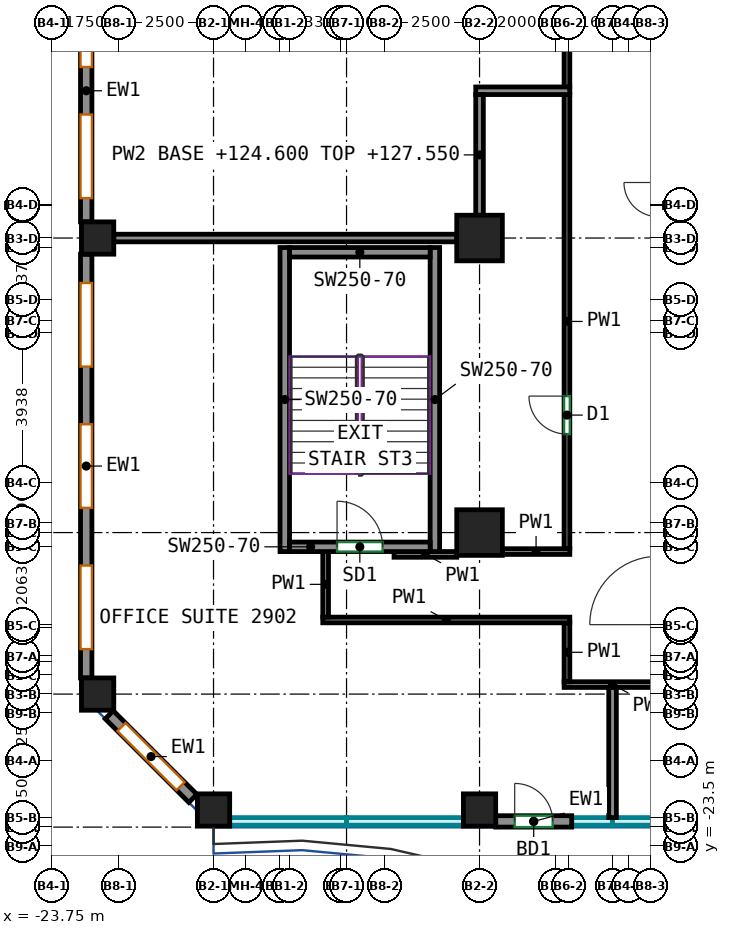
"""IFC4 building model, lengths in metres.
Left out: names, types, materials, properties, quantities, classifications, styles, units other than length and angle.
Written with IfcOpenShell. Run it as: python <this file> out.ifc"""

import sys

from ifc_helpers import new_model, si_unit, direction, frame, frame_2d, origin, origin_2d, place, context, subcontext, project, spatial, rectangle, extrude, source, transform, mapped, element, fill, save


model = new_model("IFC4")
c1 = context("Model", 3, precision=1e-05, world=origin(), true_north=direction((0.0, 1.0)))
c2 = subcontext(c1, "Body", "Model", "MODEL_VIEW")
j1 = project(units=[si_unit("LENGTHUNIT", "METRE"), si_unit("PLANEANGLEUNIT", "RADIAN")], contexts=[c1])
p1 = place(None, origin())
s1 = spatial("IfcSite", under=j1, at=p1, CompositionType="ELEMENT")
p2 = place(p1, origin())
s2 = spatial("IfcBuilding", under=s1, at=p2, CompositionType="ELEMENT")
p3 = place(p2, frame((0.0, 0.0, 124.6)))
s3 = spatial("IfcBuildingStorey", under=s2, at=p3, CompositionType="ELEMENT", Elevation=124.6)
m1 = source(origin(), c2, "Body", "SweptSolid", [
    extrude(rectangle(XDim=0.85, YDim=0.85, at=origin_2d()), origin(), (0.0, 0.0, 1.0), 3.6),
])
for number, where, z_axis, x_axis in (
    (1, (-22.55, -19.5, 0.0), (0.0, 0.0, 1.0), (1.0, 0.0, 0.0)),
    (2, (-22.55, -7.5, 0.0), (0.0, 0.0, 1.0), (1.0, 0.0, 0.0)),
    (3, (-19.5, -22.55, 0.0), (0.0, 0.0, 1.0), (1.0, 0.0, 0.0)),
    (4, (-12.5, -22.55, 0.0), (0.0, 0.0, 1.0), (1.0, 0.0, 0.0)),
):
    element("IfcColumn", number, at=place(p3, frame(where, z_axis=z_axis, x_axis=x_axis)), inside=s3, PredefinedType="COLUMN", context=c2, shape_type="MappedRepresentation", body=[
        mapped(m1, transform((0.0, 0.0, 0.0))),
    ])
m2 = source(origin(), c2, "Body", "SweptSolid", [
    extrude(rectangle(XDim=1.2, YDim=1.2, at=origin_2d()), origin(), (0.0, 0.0, 1.0), 3.6),
])
for number, where, z_axis, x_axis in (
    (5, (-12.5, -15.25, 0.0), (0.0, 0.0, 1.0), (1.0, 0.0, 0.0)),
    (6, (-12.5, -7.5, 0.0), (0.0, 0.0, 1.0), (1.0, 0.0, 0.0)),
):
    element("IfcColumn", number, at=place(p3, frame(where, z_axis=z_axis, x_axis=x_axis)), inside=s3, PredefinedType="COLUMN", context=c2, shape_type="MappedRepresentation", body=[
        mapped(m2, transform((0.0, 0.0, 0.0))),
    ])
m3 = source(origin(), c2, "Body", "SweptSolid", [
    extrude(rectangle(XDim=8.0, YDim=0.25, at=frame_2d((4.0, 0.0))), origin(), (0.0, 0.0, 1.0), 3.6),
])
for number, where, z_axis, x_axis in (
    (7, (-17.625, -15.75, 0.0), (0.0, 0.0, 1.0), (0.0, 1.0, 0.0)),
    (8, (-13.675, -15.75, 0.0), (0.0, 0.0, 1.0), (0.0, 1.0, 0.0)),
):
    element("IfcWall", number, at=place(p3, frame(where, z_axis=z_axis, x_axis=x_axis)), inside=s3, PredefinedType="SHEAR", context=c2, shape_type="MappedRepresentation", body=[
        mapped(m3, transform((0.0, 0.0, 0.0))),
    ])
m4 = source(origin(), c2, "Body", "SweptSolid", [
    extrude(rectangle(XDim=3.7, YDim=0.25, at=frame_2d((1.85, 0.0))), origin(), (0.0, 0.0, 1.0), 3.6),
])
p4 = place(p3, frame((-17.5, -15.625, 0.0), z_axis=(0.0, 0.0, 1.0), x_axis=(1.0, 0.0, 0.0)))
e9 = element("IfcWall", 9, at=p4, inside=s3, PredefinedType="SHEAR", context=c2, shape_type="MappedRepresentation", body=[
    mapped(m4, transform((0.0, 0.0, 0.0))),
])
p5 = place(p4, frame((1.25, 0.0, 0.0)))
e10 = element("IfcOpeningElement", 10, at=p5, cuts=e9, PredefinedType="OPENING", context=c2, shape_type="SweptSolid", body=[
    extrude(rectangle(XDim=1.2, YDim=2.1, at=frame_2d((0.6, 1.05))), frame((0.0, 0.135, 0.0), z_axis=(0.0, -1.0, 0.0), x_axis=(1.0, 0.0, 0.0)), (0.0, 0.0, 1.0), 0.27),
])
p6 = place(p3, frame((-17.5, -7.875, 0.0), z_axis=(0.0, 0.0, 1.0), x_axis=(1.0, 0.0, 0.0)))
e11 = element("IfcWall", 11, at=p6, inside=s3, PredefinedType="SHEAR", context=c2, shape_type="MappedRepresentation", body=[
    mapped(m4, transform((0.0, 0.0, 0.0))),
])
m5 = source(origin(), c2, "Body", "SweptSolid", [
    extrude(rectangle(XDim=2.0, YDim=0.3, at=frame_2d((1.0, 0.0))), origin(), (0.0, 0.0, 1.0), 3.6),
])
p7 = place(p3, frame((-12.075, -22.85, 0.0), z_axis=(0.0, 0.0, 1.0), x_axis=(1.0, 0.0, 0.0)))
e12 = element("IfcWall", 12, at=p7, inside=s3, PredefinedType="SOLIDWALL", context=c2, shape_type="MappedRepresentation", body=[
    mapped(m5, transform((0.0, 0.0, 0.0))),
])
p8 = place(p7, frame((0.5, 0.0, 0.0)))
e13 = element("IfcOpeningElement", 13, at=p8, cuts=e12, PredefinedType="OPENING", context=c2, shape_type="SweptSolid", body=[
    extrude(rectangle(XDim=1.0, YDim=2.1, at=frame_2d((0.5, 1.05))), frame((0.0, 0.16, 0.0), z_axis=(0.0, -1.0, 0.0), x_axis=(1.0, 0.0, 0.0)), (0.0, 0.0, 1.0), 0.32),
])
m6 = source(origin(), c2, "Body", "SweptSolid", [
    extrude(rectangle(XDim=6.9, YDim=0.3, at=frame_2d((3.45, 0.0))), origin(), (0.0, 0.0, 1.0), 3.6),
])
p9 = place(p3, frame((-22.85, -0.175, 0.0), z_axis=(0.0, 0.0, 1.0), x_axis=(0.0, -1.0, 0.0)))
e14 = element("IfcWall", 14, at=p9, inside=s3, PredefinedType="SOLIDWALL", context=c2, shape_type="MappedRepresentation", body=[
    mapped(m6, transform((0.0, 0.0, 0.0))),
])
p10 = place(p9, frame((0.625, 0.0, 0.7)))
e15 = element("IfcOpeningElement", 15, at=p10, cuts=e14, PredefinedType="OPENING", context=c2, shape_type="SweptSolid", body=[
    extrude(rectangle(XDim=2.2, YDim=2.25, at=frame_2d((1.1, 1.125))), frame((0.0, 0.16, 0.0), z_axis=(0.0, -1.0, 0.0), x_axis=(1.0, 0.0, 0.0)), (0.0, 0.0, 1.0), 0.32),
])
p11 = place(p9, frame((4.075, 0.0, 0.7)))
e16 = element("IfcOpeningElement", 16, at=p11, cuts=e14, PredefinedType="OPENING", context=c2, shape_type="SweptSolid", body=[
    extrude(rectangle(XDim=2.2, YDim=2.25, at=frame_2d((1.1, 1.125))), frame((0.0, 0.16, 0.0), z_axis=(0.0, -1.0, 0.0), x_axis=(1.0, 0.0, 0.0)), (0.0, 0.0, 1.0), 0.32),
])
m7 = source(origin(), c2, "Body", "SweptSolid", [
    extrude(rectangle(XDim=11.15, YDim=0.3, at=frame_2d((5.575, 0.0))), origin(), (0.0, 0.0, 1.0), 3.6),
])
p12 = place(p3, frame((-22.85, -7.925, 0.0), z_axis=(0.0, 0.0, 1.0), x_axis=(0.0, -1.0, 0.0)))
e17 = element("IfcWall", 17, at=p12, inside=s3, PredefinedType="SOLIDWALL", context=c2, shape_type="MappedRepresentation", body=[
    mapped(m7, transform((0.0, 0.0, 0.0))),
])
p13 = place(p12, frame((0.758, 0.0, 0.7)))
e18 = element("IfcOpeningElement", 18, at=p13, cuts=e17, PredefinedType="OPENING", context=c2, shape_type="SweptSolid", body=[
    extrude(rectangle(XDim=2.2, YDim=2.25, at=frame_2d((1.1, 1.125))), frame((0.0, 0.16, 0.0), z_axis=(0.0, -1.0, 0.0), x_axis=(1.0, 0.0, 0.0)), (0.0, 0.0, 1.0), 0.32),
])
p14 = place(p12, frame((4.475, 0.0, 0.7)))
e19 = element("IfcOpeningElement", 19, at=p14, cuts=e17, PredefinedType="OPENING", context=c2, shape_type="SweptSolid", body=[
    extrude(rectangle(XDim=2.2, YDim=2.25, at=frame_2d((1.1, 1.125))), frame((0.0, 0.16, 0.0), z_axis=(0.0, -1.0, 0.0), x_axis=(1.0, 0.0, 0.0)), (0.0, 0.0, 1.0), 0.32),
])
p15 = place(p12, frame((8.192, 0.0, 0.7)))
e20 = element("IfcOpeningElement", 20, at=p15, cuts=e17, PredefinedType="OPENING", context=c2, shape_type="SweptSolid", body=[
    extrude(rectangle(XDim=2.2, YDim=2.25, at=frame_2d((1.1, 1.125))), frame((0.0, 0.16, 0.0), z_axis=(0.0, -1.0, 0.0), x_axis=(1.0, 0.0, 0.0)), (0.0, 0.0, 1.0), 0.32),
])
m8 = source(origin(), c2, "Body", "SweptSolid", [
    extrude(rectangle(XDim=3.111, YDim=0.3, at=frame_2d((1.556, 0.0))), origin(), (0.0, 0.0, 1.0), 3.6),
])
p16 = place(p3, frame((-22.244, -20.044, 0.0), z_axis=(0.0, 0.0, 1.0), x_axis=(0.707106781187, -0.707106781187, 0.0)))
e21 = element("IfcWall", 21, at=p16, inside=s3, PredefinedType="SOLIDWALL", context=c2, shape_type="MappedRepresentation", body=[
    mapped(m8, transform((0.0, 0.0, 0.0))),
])
p17 = place(p16, frame((0.456, 0.0, 0.7)))
e22 = element("IfcOpeningElement", 22, at=p17, cuts=e21, PredefinedType="OPENING", context=c2, shape_type="SweptSolid", body=[
    extrude(rectangle(XDim=2.2, YDim=2.25, at=frame_2d((1.1, 1.125))), frame((0.0, 0.16, 0.0), z_axis=(0.0, -1.0, 0.0), x_axis=(1.0, 0.0, 0.0)), (0.0, 0.0, 1.0), 0.32),
])
p18 = place(p3, frame((-10.2, -3.535, 0.0), z_axis=(0.0, 0.0, 1.0), x_axis=(0.0, 1.0, 0.0)))
e23 = element("IfcWall", 23, at=p18, inside=s3, PredefinedType="PARTITIONING", context=c2, shape_type="SweptSolid", body=[
    extrude(rectangle(XDim=6.41, YDim=0.15, at=frame_2d((3.205, 0.0))), origin(), (0.0, 0.0, 1.0), 3.6),
])
p19 = place(p18, frame((1.402, 0.0, 0.0)))
e24 = element("IfcOpeningElement", 24, at=p19, cuts=e23, PredefinedType="OPENING", context=c2, shape_type="SweptSolid", body=[
    extrude(rectangle(XDim=1.0, YDim=2.1, at=frame_2d((0.5, 1.05))), frame((0.0, 0.085, 0.0), z_axis=(0.0, -1.0, 0.0), x_axis=(1.0, 0.0, 0.0)), (0.0, 0.0, 1.0), 0.17),
])
p20 = place(p3, frame((-10.125, -15.75, 0.0), z_axis=(0.0, 0.0, 1.0), x_axis=(-1.0, 0.0, 0.0)))
e25 = element("IfcWall", 25, at=p20, inside=s3, PredefinedType="PARTITIONING", context=c2, shape_type="SweptSolid", body=[
    extrude(rectangle(XDim=1.775, YDim=0.15, at=frame_2d((0.887, 0.0))), origin(), (0.0, 0.0, 1.0), 3.6),
])
p21 = place(p3, frame((-10.2, -15.675, 0.0), z_axis=(0.0, 0.0, 1.0), x_axis=(0.0, 1.0, 0.0)))
e26 = element("IfcWall", 26, at=p21, inside=s3, PredefinedType="PARTITIONING", context=c2, shape_type="SweptSolid", body=[
    extrude(rectangle(XDim=11.96, YDim=0.15, at=frame_2d((5.98, 0.0))), origin(), (0.0, 0.0, 1.0), 3.6),
])
p22 = place(p21, frame((3.016, 0.0, 0.0)))
e27 = element("IfcOpeningElement", 27, at=p22, cuts=e26, PredefinedType="OPENING", context=c2, shape_type="SweptSolid", body=[
    extrude(rectangle(XDim=1.0, YDim=2.1, at=frame_2d((0.5, 1.05))), frame((0.0, 0.085, 0.0), z_axis=(0.0, -1.0, 0.0), x_axis=(1.0, 0.0, 0.0)), (0.0, 0.0, 1.0), 0.17),
])
p23 = place(p3, frame((-10.275, -19.25, 0.0), z_axis=(0.0, 0.0, 1.0), x_axis=(1.0, 0.0, 0.0)))
e28 = element("IfcWall", 28, at=p23, inside=s3, PredefinedType="PARTITIONING", context=c2, shape_type="SweptSolid", body=[
    extrude(rectangle(XDim=2.55, YDim=0.15, at=frame_2d((1.275, 0.0))), origin(), (0.0, 0.0, 1.0), 2.95),
])
p24 = place(p3, frame((-10.2, -19.175, 0.0), z_axis=(0.0, 0.0, 1.0), x_axis=(0.0, 1.0, 0.0)))
e29 = element("IfcWall", 29, at=p24, inside=s3, PredefinedType="PARTITIONING", context=c2, shape_type="SweptSolid", body=[
    extrude(rectangle(XDim=1.55, YDim=0.15, at=frame_2d((0.775, 0.0))), origin(), (0.0, 0.0, 1.0), 3.6),
])
p25 = place(p3, frame((-16.625, -17.55, 0.0), z_axis=(0.0, 0.0, 1.0), x_axis=(1.0, 0.0, 0.0)))
e30 = element("IfcWall", 30, at=p25, inside=s3, PredefinedType="PARTITIONING", context=c2, shape_type="SweptSolid", body=[
    extrude(rectangle(XDim=6.5, YDim=0.15, at=frame_2d((3.25, 0.0))), origin(), (0.0, 0.0, 1.0), 3.6),
])
p26 = place(p3, frame((-16.55, -15.75, 0.0), z_axis=(0.0, 0.0, 1.0), x_axis=(0.0, -1.0, 0.0)))
e31 = element("IfcWall", 31, at=p26, inside=s3, PredefinedType="PARTITIONING", context=c2, shape_type="SweptSolid", body=[
    extrude(rectangle(XDim=1.725, YDim=0.15, at=frame_2d((0.863, 0.0))), origin(), (0.0, 0.0, 1.0), 3.6),
])
p27 = place(p3, frame((-13.1, -15.825, 0.0), z_axis=(0.0, 0.0, 1.0), x_axis=(-1.0, 0.0, 0.0)))
e32 = element("IfcWall", 32, at=p27, inside=s3, PredefinedType="PARTITIONING", context=c2, shape_type="SweptSolid", body=[
    extrude(rectangle(XDim=1.65, YDim=0.15, at=frame_2d((0.825, 0.0))), origin(), (0.0, 0.0, 1.0), 3.6),
])
p28 = place(p3, frame((-12.6, -3.625, 0.0), z_axis=(0.0, 0.0, 1.0), x_axis=(1.0, 0.0, 0.0)))
e33 = element("IfcWall", 33, at=p28, inside=s3, PredefinedType="PARTITIONING", context=c2, shape_type="SweptSolid", body=[
    extrude(rectangle(XDim=2.474, YDim=0.2, at=frame_2d((1.237, 0.0))), origin(), (0.0, 0.0, 1.0), 3.6),
])
p29 = place(p3, frame((-12.5, -6.9, 0.0), z_axis=(0.0, 0.0, 1.0), x_axis=(0.0, 1.0, 0.0)))
e34 = element("IfcWall", 34, at=p29, inside=s3, PredefinedType="PARTITIONING", context=c2, shape_type="SweptSolid", body=[
    extrude(rectangle(XDim=3.175, YDim=0.2, at=frame_2d((1.587, 0.0))), origin(), (0.0, 0.0, 1.0), 2.95),
])
p30 = place(p3, frame((-22.125, -7.5, 0.0), z_axis=(0.0, 0.0, 1.0), x_axis=(1.0, 0.0, 0.0)))
e35 = element("IfcWall", 35, at=p30, inside=s3, PredefinedType="PARTITIONING", context=c2, shape_type="SweptSolid", body=[
    extrude(rectangle(XDim=9.025, YDim=0.2, at=frame_2d((4.512, 0.0))), origin(), (0.0, 0.0, 1.0), 3.6),
])
p31 = place(p3, frame((-9.0, -22.75, 0.0), z_axis=(0.0, 0.0, 1.0), x_axis=(0.0, 1.0, 0.0)))
e36 = element("IfcWall", 36, at=p31, inside=s3, PredefinedType="PARTITIONING", context=c2, shape_type="SweptSolid", body=[
    extrude(rectangle(XDim=3.424, YDim=0.2, at=frame_2d((1.712, 0.0))), origin(), (0.0, 0.0, 1.0), 3.6),
])
p32 = place(p8, origin())
e37 = element("IfcDoor", 37, at=p32, inside=s3, OperationType="SINGLE_SWING_LEFT", PredefinedType="DOOR", context=c2, shape_type="SweptSolid", body=[
    extrude(rectangle(XDim=1.0, YDim=2.1, at=frame_2d((0.5, 1.05))), frame((0.0, 0.025, 0.0), z_axis=(0.0, -1.0, 0.0), x_axis=(1.0, 0.0, 0.0)), (0.0, 0.0, 1.0), 0.05),
])
fill(e13, e37)
p33 = place(p10, origin())
e38 = element("IfcWindow", 38, at=p33, inside=s3, PartitioningType="SINGLE_PANEL", PredefinedType="WINDOW", context=c2, shape_type="SweptSolid", body=[
    extrude(rectangle(XDim=2.2, YDim=2.25, at=frame_2d((1.1, 1.125))), frame((0.0, 0.03, 0.0), z_axis=(0.0, -1.0, 0.0), x_axis=(1.0, 0.0, 0.0)), (0.0, 0.0, 1.0), 0.06),
])
fill(e15, e38)
p34 = place(p11, origin())
e39 = element("IfcWindow", 39, at=p34, inside=s3, PartitioningType="SINGLE_PANEL", PredefinedType="WINDOW", context=c2, shape_type="SweptSolid", body=[
    extrude(rectangle(XDim=2.2, YDim=2.25, at=frame_2d((1.1, 1.125))), frame((0.0, 0.03, 0.0), z_axis=(0.0, -1.0, 0.0), x_axis=(1.0, 0.0, 0.0)), (0.0, 0.0, 1.0), 0.06),
])
fill(e16, e39)
p35 = place(p13, origin())
e40 = element("IfcWindow", 40, at=p35, inside=s3, PartitioningType="SINGLE_PANEL", PredefinedType="WINDOW", context=c2, shape_type="SweptSolid", body=[
    extrude(rectangle(XDim=2.2, YDim=2.25, at=frame_2d((1.1, 1.125))), frame((0.0, 0.03, 0.0), z_axis=(0.0, -1.0, 0.0), x_axis=(1.0, 0.0, 0.0)), (0.0, 0.0, 1.0), 0.06),
])
fill(e18, e40)
p36 = place(p14, origin())
e41 = element("IfcWindow", 41, at=p36, inside=s3, PartitioningType="SINGLE_PANEL", PredefinedType="WINDOW", context=c2, shape_type="SweptSolid", body=[
    extrude(rectangle(XDim=2.2, YDim=2.25, at=frame_2d((1.1, 1.125))), frame((0.0, 0.03, 0.0), z_axis=(0.0, -1.0, 0.0), x_axis=(1.0, 0.0, 0.0)), (0.0, 0.0, 1.0), 0.06),
])
fill(e19, e41)
p37 = place(p15, origin())
e42 = element("IfcWindow", 42, at=p37, inside=s3, PartitioningType="SINGLE_PANEL", PredefinedType="WINDOW", context=c2, shape_type="SweptSolid", body=[
    extrude(rectangle(XDim=2.2, YDim=2.25, at=frame_2d((1.1, 1.125))), frame((0.0, 0.03, 0.0), z_axis=(0.0, -1.0, 0.0), x_axis=(1.0, 0.0, 0.0)), (0.0, 0.0, 1.0), 0.06),
])
fill(e20, e42)
p38 = place(p17, origin())
e43 = element("IfcWindow", 43, at=p38, inside=s3, PartitioningType="SINGLE_PANEL", PredefinedType="WINDOW", context=c2, shape_type="SweptSolid", body=[
    extrude(rectangle(XDim=2.2, YDim=2.25, at=frame_2d((1.1, 1.125))), frame((0.0, 0.03, 0.0), z_axis=(0.0, -1.0, 0.0), x_axis=(1.0, 0.0, 0.0)), (0.0, 0.0, 1.0), 0.06),
])
fill(e22, e43)
p39 = place(p5, origin())
e44 = element("IfcDoor", 44, at=p39, inside=s3, OperationType="DOUBLE_DOOR_SINGLE_SWING", PredefinedType="DOOR", context=c2, shape_type="SweptSolid", body=[
    extrude(rectangle(XDim=1.2, YDim=2.1, at=frame_2d((0.6, 1.05))), frame((0.0, 0.025, 0.0), z_axis=(0.0, -1.0, 0.0), x_axis=(1.0, 0.0, 0.0)), (0.0, 0.0, 1.0), 0.05),
])
fill(e10, e44)
p40 = place(p22, origin())
e45 = element("IfcDoor", 45, at=p40, inside=s3, OperationType="SINGLE_SWING_RIGHT", PredefinedType="DOOR", context=c2, shape_type="SweptSolid", body=[
    extrude(rectangle(XDim=1.0, YDim=2.1, at=frame_2d((0.5, 1.05))), frame((0.0, 0.025, 0.0), z_axis=(0.0, -1.0, 0.0), x_axis=(1.0, 0.0, 0.0)), (0.0, 0.0, 1.0), 0.05),
])
fill(e27, e45)
save(model, sys.argv[1])
